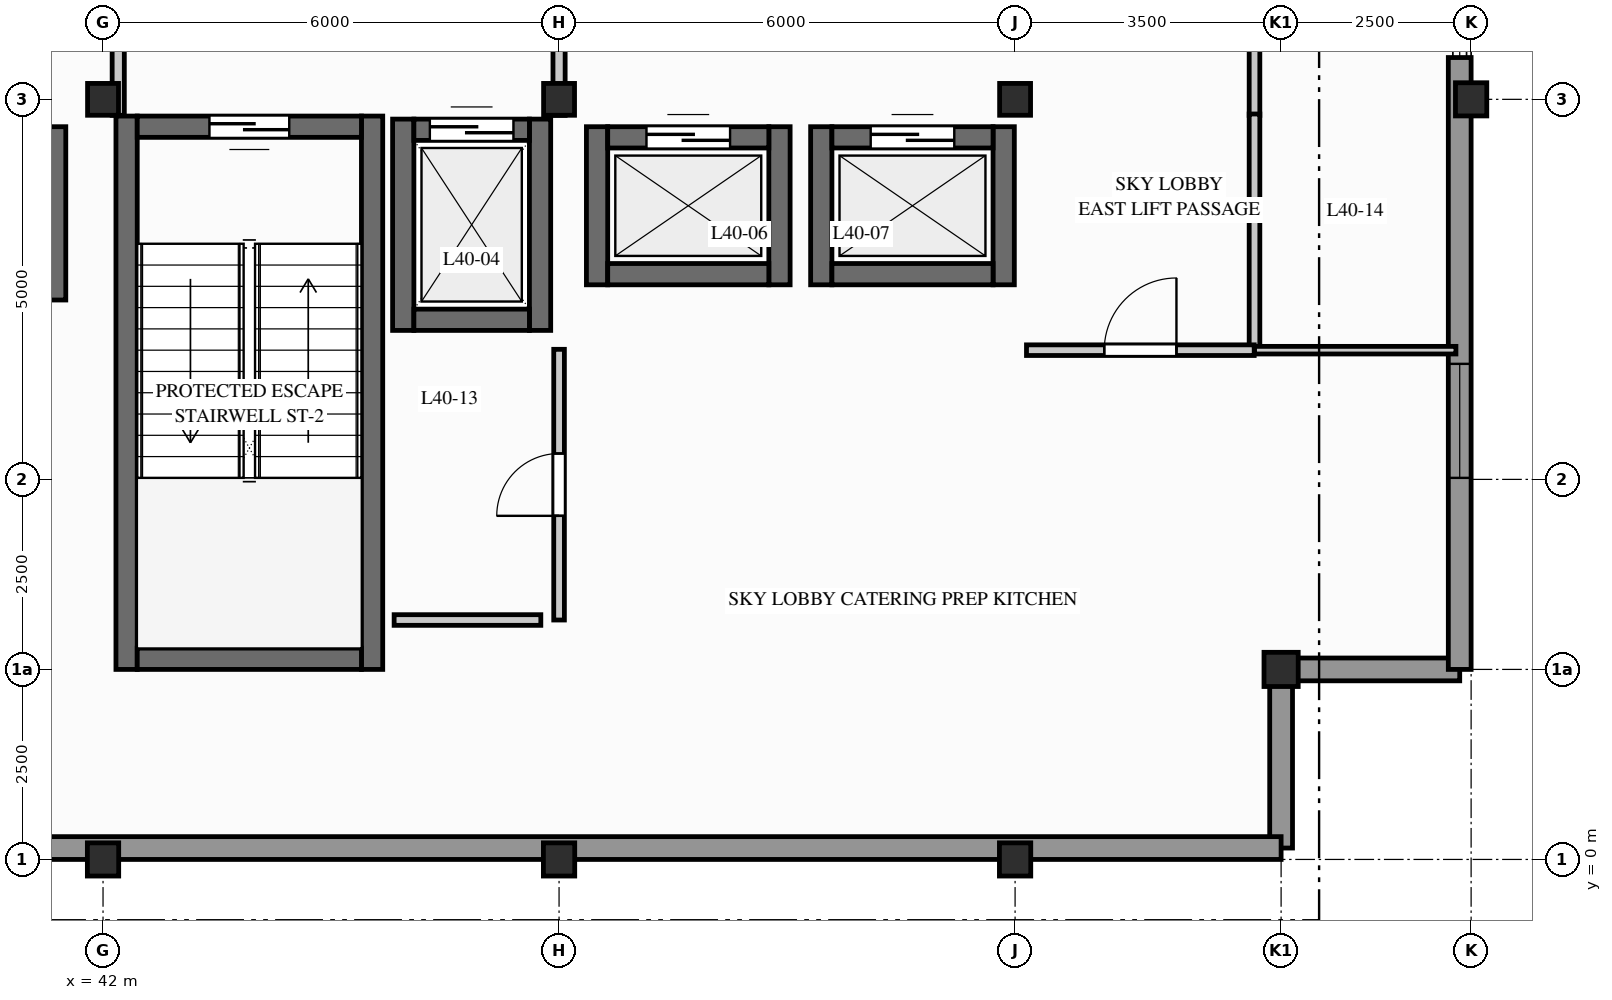
"""IFC4 building model, lengths in metres.
Left out: names, types, materials, properties, quantities, classifications, styles, units other than length and angle.
Written with IfcOpenShell. Run it as: python <this file> out.ifc"""

import sys

from ifc_helpers import new_model, si_unit, direction, frame, frame_2d, origin, origin_2d, place, context, subcontext, project, spatial, rectangle, hollow_rectangle, i_section, extrude, element, fill, save


model = new_model("IFC4")
c1 = context("Model", 3, precision=1e-05, world=origin(), true_north=direction((0.0, 1.0)))
c2 = subcontext(c1, "Body", "Model", "MODEL_VIEW")
j1 = project(units=[si_unit("LENGTHUNIT", "METRE"), si_unit("PLANEANGLEUNIT", "RADIAN")], contexts=[c1])
p1 = place(None, origin())
s1 = spatial("IfcSite", under=j1, at=p1, CompositionType="ELEMENT")
p2 = place(p1, origin())
s2 = spatial("IfcBuilding", under=s1, at=p2, CompositionType="ELEMENT")
p3 = place(p2, frame((0.0, 0.0, 134.5)))
s3 = spatial("IfcBuildingStorey", under=s2, at=p3, CompositionType="ELEMENT", Elevation=134.5)
p4 = place(p3, frame((42.0, 0.0, 0.0), z_axis=(0.0, 0.0, 1.0), x_axis=(1.0, 0.0, 0.0)))
e1 = element("IfcColumn", 1, at=p4, inside=s3, PredefinedType="COLUMN", context=c2, shape_type="SweptSolid", body=[
    extrude(i_section(OverallWidth=0.412, OverallDepth=0.437, WebThickness=0.036, FlangeThickness=0.058, FilletRadius=0.015, at=origin_2d()), origin(), (0.0, 0.0, 1.0), 4.2),
])
p5 = place(p3, frame((42.0, 10.0, 0.0), z_axis=(0.0, 0.0, 1.0), x_axis=(1.0, 0.0, 0.0)))
e2 = element("IfcColumn", 2, at=p5, inside=s3, PredefinedType="COLUMN", context=c2, shape_type="SweptSolid", body=[
    extrude(i_section(OverallWidth=0.407, OverallDepth=0.419, WebThickness=0.031, FlangeThickness=0.049, FilletRadius=0.015, at=origin_2d()), origin(), (0.0, 0.0, 1.0), 4.2),
])
p6 = place(p3, frame((48.0, 0.0, 0.0), z_axis=(0.0, 0.0, 1.0), x_axis=(1.0, 0.0, 0.0)))
e3 = element("IfcColumn", 3, at=p6, inside=s3, PredefinedType="COLUMN", context=c2, shape_type="SweptSolid", body=[
    extrude(i_section(OverallWidth=0.412, OverallDepth=0.437, WebThickness=0.036, FlangeThickness=0.058, FilletRadius=0.015, at=origin_2d()), origin(), (0.0, 0.0, 1.0), 4.2),
])
p7 = place(p3, frame((48.0, 10.0, 0.0), z_axis=(0.0, 0.0, 1.0), x_axis=(1.0, 0.0, 0.0)))
e4 = element("IfcColumn", 4, at=p7, inside=s3, PredefinedType="COLUMN", context=c2, shape_type="SweptSolid", body=[
    extrude(i_section(OverallWidth=0.407, OverallDepth=0.419, WebThickness=0.031, FlangeThickness=0.049, FilletRadius=0.015, at=origin_2d()), origin(), (0.0, 0.0, 1.0), 4.2),
])
p8 = place(p3, frame((54.0, 0.0, 0.0), z_axis=(0.0, 0.0, 1.0), x_axis=(1.0, 0.0, 0.0)))
e5 = element("IfcColumn", 5, at=p8, inside=s3, PredefinedType="COLUMN", context=c2, shape_type="SweptSolid", body=[
    extrude(i_section(OverallWidth=0.412, OverallDepth=0.437, WebThickness=0.036, FlangeThickness=0.058, FilletRadius=0.015, at=origin_2d()), origin(), (0.0, 0.0, 1.0), 4.2),
])
p9 = place(p3, frame((54.0, 10.0, 0.0), z_axis=(0.0, 0.0, 1.0), x_axis=(1.0, 0.0, 0.0)))
e6 = element("IfcColumn", 6, at=p9, inside=s3, PredefinedType="COLUMN", context=c2, shape_type="SweptSolid", body=[
    extrude(i_section(OverallWidth=0.407, OverallDepth=0.419, WebThickness=0.031, FlangeThickness=0.049, FilletRadius=0.015, at=origin_2d()), origin(), (0.0, 0.0, 1.0), 4.2),
])
p10 = place(p3, frame((57.5, 2.5, 0.0), z_axis=(0.0, 0.0, 1.0), x_axis=(1.0, 0.0, 0.0)))
e7 = element("IfcColumn", 7, at=p10, inside=s3, PredefinedType="COLUMN", context=c2, shape_type="SweptSolid", body=[
    extrude(hollow_rectangle(XDim=0.45, YDim=0.45, WallThickness=0.025, InnerFilletRadius=0.012, OuterFilletRadius=0.024, at=origin_2d()), origin(), (0.0, 0.0, 1.0), 4.2),
])
p11 = place(p3, frame((60.0, 10.0, 0.0), z_axis=(0.0, 0.0, 1.0), x_axis=(1.0, 0.0, 0.0)))
e8 = element("IfcColumn", 8, at=p11, inside=s3, PredefinedType="COLUMN", context=c2, shape_type="SweptSolid", body=[
    extrude(i_section(OverallWidth=0.412, OverallDepth=0.437, WebThickness=0.036, FlangeThickness=0.058, FilletRadius=0.015, at=origin_2d()), origin(), (0.0, 0.0, 1.0), 4.2),
])
for number, where, z_axis, x_axis in (
    (9, (57.5, 0.15, 0.0), (0.0, 0.0, 1.0), (0.0, 1.0, 0.0)),
    (10, (57.5, 2.5, 0.0), (0.0, 0.0, 1.0), (1.0, 0.0, 0.0)),
):
    element("IfcWall", number, at=place(p3, frame(where, z_axis=z_axis, x_axis=x_axis)), inside=s3, PredefinedType="STANDARD", context=c2, shape_type="SweptSolid", body=[
        extrude(rectangle(XDim=2.35, YDim=0.3, at=frame_2d((1.175, 0.0))), origin(), (0.0, 0.0, 1.0), 3.98),
    ])
p12 = place(p3, frame((2.5, 0.15, 0.0), z_axis=(0.0, 0.0, 1.0), x_axis=(1.0, 0.0, 0.0)))
e11 = element("IfcWall", 11, at=p12, inside=s3, PredefinedType="STANDARD", context=c2, shape_type="SweptSolid", body=[
    extrude(rectangle(XDim=55.0, YDim=0.3, at=frame_2d((27.5, 0.0))), origin(), (0.0, 0.0, 1.0), 3.422),
])
p13 = place(p3, frame((59.85, 2.5, 0.0), z_axis=(0.0, 0.0, 1.0), x_axis=(0.0, 1.0, 0.0)))
e12 = element("IfcWall", 12, at=p13, inside=s3, PredefinedType="STANDARD", context=c2, shape_type="SweptSolid", body=[
    extrude(rectangle(XDim=8.05, YDim=0.3, at=frame_2d((4.025, 0.0))), origin(), (0.0, 0.0, 1.0), 3.98),
])
p14 = place(p13, frame((2.52, 0.0, 0.95)))
e13 = element("IfcOpeningElement", 13, at=p14, cuts=e12, PredefinedType="OPENING", context=c2, shape_type="SweptSolid", body=[
    extrude(rectangle(XDim=1.5, YDim=1.8, at=frame_2d((0.75, 0.9))), frame((0.0, 0.16, 0.0), z_axis=(0.0, -1.0, 0.0), x_axis=(1.0, 0.0, 0.0)), (0.0, 0.0, 1.0), 0.32),
])
for number, where, z_axis, x_axis in (
    (14, (42.31, 2.5, 0.0), (0.0, 0.0, 1.0), (0.0, 1.0, 0.0)),
    (15, (45.54, 2.5, 0.0), (0.0, 0.0, 1.0), (0.0, 1.0, 0.0)),
):
    element("IfcWall", number, at=place(p3, frame(where, z_axis=z_axis, x_axis=x_axis)), inside=s3, PredefinedType="SHEAR", context=c2, shape_type="SweptSolid", body=[
        extrude(rectangle(XDim=7.28, YDim=0.28, at=frame_2d((3.64, 0.0))), origin(), (0.0, 0.0, 1.0), 3.98),
    ])
p15 = place(p3, frame((42.45, 2.64, 0.0), z_axis=(0.0, 0.0, 1.0), x_axis=(1.0, 0.0, 0.0)))
e16 = element("IfcWall", 16, at=p15, inside=s3, PredefinedType="SHEAR", context=c2, shape_type="SweptSolid", body=[
    extrude(rectangle(XDim=2.95, YDim=0.28, at=frame_2d((1.475, 0.0))), origin(), (0.0, 0.0, 1.0), 3.98),
])
p16 = place(p3, frame((45.4, 9.64, 0.0), z_axis=(0.0, 0.0, 1.0), x_axis=(-1.0, 0.0, 0.0)))
e17 = element("IfcWall", 17, at=p16, inside=s3, PredefinedType="SHEAR", context=c2, shape_type="SweptSolid", body=[
    extrude(rectangle(XDim=2.95, YDim=0.28, at=frame_2d((1.475, 0.0))), origin(), (0.0, 0.0, 1.0), 3.98),
])
p17 = place(p16, frame((0.95, 0.0, 0.0)))
e18 = element("IfcOpeningElement", 18, at=p17, cuts=e17, PredefinedType="OPENING", context=c2, shape_type="SweptSolid", body=[
    extrude(rectangle(XDim=1.05, YDim=2.06, at=frame_2d((0.525, 1.03))), frame((0.0, 0.15, 0.0), z_axis=(0.0, -1.0, 0.0), x_axis=(1.0, 0.0, 0.0)), (0.0, 0.0, 1.0), 0.3),
])
for number, where, z_axis, x_axis in (
    (19, (45.95, 6.96, 0.0), (0.0, 0.0, 1.0), (0.0, 1.0, 0.0)),
    (20, (47.75, 6.96, 0.0), (0.0, 0.0, 1.0), (0.0, 1.0, 0.0)),
):
    element("IfcWall", number, at=place(p3, frame(where, z_axis=z_axis, x_axis=x_axis)), inside=s3, PredefinedType="SHEAR", context=c2, shape_type="SweptSolid", body=[
        extrude(rectangle(XDim=2.78, YDim=0.28, at=frame_2d((1.39, 0.0))), origin(), (0.0, 0.0, 1.0), 3.98),
    ])
p18 = place(p3, frame((46.09, 7.1, 0.0), z_axis=(0.0, 0.0, 1.0), x_axis=(1.0, 0.0, 0.0)))
e21 = element("IfcWall", 21, at=p18, inside=s3, PredefinedType="SHEAR", context=c2, shape_type="SweptSolid", body=[
    extrude(rectangle(XDim=1.52, YDim=0.28, at=frame_2d((0.76, 0.0))), origin(), (0.0, 0.0, 1.0), 3.98),
])
p19 = place(p3, frame((46.09, 9.6, 0.0), z_axis=(0.0, 0.0, 1.0), x_axis=(1.0, 0.0, 0.0)))
e22 = element("IfcWall", 22, at=p19, inside=s3, PredefinedType="SHEAR", context=c2, shape_type="SweptSolid", body=[
    extrude(rectangle(XDim=1.52, YDim=0.28, at=frame_2d((0.76, 0.0))), origin(), (0.0, 0.0, 1.0), 3.98),
])
p20 = place(p19, frame((0.21, 0.0, 0.0)))
e23 = element("IfcOpeningElement", 23, at=p20, cuts=e22, PredefinedType="OPENING", context=c2, shape_type="SweptSolid", body=[
    extrude(rectangle(XDim=1.1, YDim=2.06, at=frame_2d((0.55, 1.03))), frame((0.0, 0.15, 0.0), z_axis=(0.0, -1.0, 0.0), x_axis=(1.0, 0.0, 0.0)), (0.0, 0.0, 1.0), 0.3),
])
p21 = place(p3, frame((41.37, 7.36, 0.0), z_axis=(0.0, 0.0, 1.0), x_axis=(0.0, 1.0, 0.0)))
e24 = element("IfcWall", 24, at=p21, inside=s3, PredefinedType="SHEAR", context=c2, shape_type="SweptSolid", body=[
    extrude(rectangle(XDim=2.28, YDim=0.28, at=frame_2d((1.14, 0.0))), origin(), (0.0, 0.0, 1.0), 3.98),
])
for number, where, z_axis, x_axis in (
    (25, (48.5, 7.56, 0.0), (0.0, 0.0, 1.0), (0.0, 1.0, 0.0)),
    (26, (50.9, 7.56, 0.0), (0.0, 0.0, 1.0), (0.0, 1.0, 0.0)),
):
    element("IfcWall", number, at=place(p3, frame(where, z_axis=z_axis, x_axis=x_axis)), inside=s3, PredefinedType="SHEAR", context=c2, shape_type="SweptSolid", body=[
        extrude(rectangle(XDim=2.08, YDim=0.28, at=frame_2d((1.04, 0.0))), origin(), (0.0, 0.0, 1.0), 3.98),
    ])
p22 = place(p3, frame((48.64, 7.7, 0.0), z_axis=(0.0, 0.0, 1.0), x_axis=(1.0, 0.0, 0.0)))
e27 = element("IfcWall", 27, at=p22, inside=s3, PredefinedType="SHEAR", context=c2, shape_type="SweptSolid", body=[
    extrude(rectangle(XDim=2.12, YDim=0.28, at=frame_2d((1.06, 0.0))), origin(), (0.0, 0.0, 1.0), 3.98),
])
p23 = place(p3, frame((48.64, 9.5, 0.0), z_axis=(0.0, 0.0, 1.0), x_axis=(1.0, 0.0, 0.0)))
e28 = element("IfcWall", 28, at=p23, inside=s3, PredefinedType="SHEAR", context=c2, shape_type="SweptSolid", body=[
    extrude(rectangle(XDim=2.12, YDim=0.28, at=frame_2d((1.06, 0.0))), origin(), (0.0, 0.0, 1.0), 3.98),
])
p24 = place(p23, frame((0.51, 0.0, 0.0)))
e29 = element("IfcOpeningElement", 29, at=p24, cuts=e28, PredefinedType="OPENING", context=c2, shape_type="SweptSolid", body=[
    extrude(rectangle(XDim=1.1, YDim=2.06, at=frame_2d((0.55, 1.03))), frame((0.0, 0.15, 0.0), z_axis=(0.0, -1.0, 0.0), x_axis=(1.0, 0.0, 0.0)), (0.0, 0.0, 1.0), 0.3),
])
for number, where, z_axis, x_axis in (
    (30, (51.45, 7.56, 0.0), (0.0, 0.0, 1.0), (0.0, 1.0, 0.0)),
    (31, (53.85, 7.56, 0.0), (0.0, 0.0, 1.0), (0.0, 1.0, 0.0)),
):
    element("IfcWall", number, at=place(p3, frame(where, z_axis=z_axis, x_axis=x_axis)), inside=s3, PredefinedType="SHEAR", context=c2, shape_type="SweptSolid", body=[
        extrude(rectangle(XDim=2.08, YDim=0.28, at=frame_2d((1.04, 0.0))), origin(), (0.0, 0.0, 1.0), 3.98),
    ])
p25 = place(p3, frame((51.59, 7.7, 0.0), z_axis=(0.0, 0.0, 1.0), x_axis=(1.0, 0.0, 0.0)))
e32 = element("IfcWall", 32, at=p25, inside=s3, PredefinedType="SHEAR", context=c2, shape_type="SweptSolid", body=[
    extrude(rectangle(XDim=2.12, YDim=0.28, at=frame_2d((1.06, 0.0))), origin(), (0.0, 0.0, 1.0), 3.98),
])
p26 = place(p3, frame((51.59, 9.5, 0.0), z_axis=(0.0, 0.0, 1.0), x_axis=(1.0, 0.0, 0.0)))
e33 = element("IfcWall", 33, at=p26, inside=s3, PredefinedType="SHEAR", context=c2, shape_type="SweptSolid", body=[
    extrude(rectangle(XDim=2.12, YDim=0.28, at=frame_2d((1.06, 0.0))), origin(), (0.0, 0.0, 1.0), 3.98),
])
p27 = place(p26, frame((0.51, 0.0, 0.0)))
e34 = element("IfcOpeningElement", 34, at=p27, cuts=e33, PredefinedType="OPENING", context=c2, shape_type="SweptSolid", body=[
    extrude(rectangle(XDim=1.1, YDim=2.06, at=frame_2d((0.55, 1.03))), frame((0.0, 0.15, 0.0), z_axis=(0.0, -1.0, 0.0), x_axis=(1.0, 0.0, 0.0)), (0.0, 0.0, 1.0), 0.3),
])
p28 = place(p3, frame((48.0, 3.15, 0.0), z_axis=(0.0, 0.0, 1.0), x_axis=(0.0, 1.0, 0.0)))
e35 = element("IfcWall", 35, at=p28, inside=s3, PredefinedType="PARTITIONING", context=c2, shape_type="SweptSolid", body=[
    extrude(rectangle(XDim=3.561, YDim=0.14, at=frame_2d((1.781, 0.0))), origin(), (0.0, 0.0, 1.0), 3.343),
])
p29 = place(p28, frame((1.371, 0.0, 0.0)))
e36 = element("IfcOpeningElement", 36, at=p29, cuts=e35, PredefinedType="OPENING", context=c2, shape_type="SweptSolid", body=[
    extrude(rectangle(XDim=0.82, YDim=2.02, at=frame_2d((0.41, 1.01))), frame((0.0, 0.08, 0.0), z_axis=(0.0, -1.0, 0.0), x_axis=(1.0, 0.0, 0.0)), (0.0, 0.0, 1.0), 0.16),
])
p30 = place(p3, frame((57.15, 9.789, 0.0), z_axis=(0.0, 0.0, 1.0), x_axis=(0.0, 1.0, 0.0)))
e37 = element("IfcWall", 37, at=p30, inside=s3, PredefinedType="PARTITIONING", context=c2, shape_type="SweptSolid", body=[
    extrude(rectangle(XDim=3.011, YDim=0.14, at=frame_2d((1.506, 0.0))), origin(), (0.0, 0.0, 1.0), 3.343),
])
p31 = place(p30, frame((1.031, 0.0, 0.0)))
e38 = element("IfcOpeningElement", 38, at=p31, cuts=e37, PredefinedType="OPENING", context=c2, shape_type="SweptSolid", body=[
    extrude(rectangle(XDim=0.95, YDim=2.05, at=frame_2d((0.475, 1.025))), frame((0.0, 0.08, 0.0), z_axis=(0.0, -1.0, 0.0), x_axis=(1.0, 0.0, 0.0)), (0.0, 0.0, 1.0), 0.16),
])
p32 = place(p3, frame((57.15, 6.7, 0.0), z_axis=(0.0, 0.0, 1.0), x_axis=(0.0, 1.0, 0.0)))
e39 = element("IfcWall", 39, at=p32, inside=s3, PredefinedType="PARTITIONING", context=c2, shape_type="SweptSolid", body=[
    extrude(rectangle(XDim=3.107, YDim=0.14, at=frame_2d((1.554, 0.0))), origin(), (0.0, 0.0, 1.0), 3.98),
])
p33 = place(p3, frame((57.15, 6.7, 0.0), z_axis=(0.0, 0.0, 1.0), x_axis=(1.0, 0.0, 0.0)))
e40 = element("IfcWall", 40, at=p33, inside=s3, PredefinedType="PARTITIONING", context=c2, shape_type="SweptSolid", body=[
    extrude(rectangle(XDim=2.65, YDim=0.1, at=frame_2d((1.325, 0.0))), origin(), (0.0, 0.0, 1.0), 3.98),
])
p34 = place(p3, frame((42.2, 9.79, 0.0), z_axis=(0.0, 0.0, 1.0), x_axis=(0.0, 1.0, 0.0)))
e41 = element("IfcWall", 41, at=p34, inside=s3, PredefinedType="PARTITIONING", context=c2, shape_type="SweptSolid", body=[
    extrude(rectangle(XDim=2.81, YDim=0.16, at=frame_2d((1.405, 0.0))), origin(), (0.0, 0.0, 1.0), 3.343),
])
p35 = place(p34, frame((0.88, 0.0, 0.0)))
e42 = element("IfcOpeningElement", 42, at=p35, cuts=e41, PredefinedType="OPENING", context=c2, shape_type="SweptSolid", body=[
    extrude(rectangle(XDim=1.05, YDim=2.06, at=frame_2d((0.525, 1.03))), frame((0.0, 0.09, 0.0), z_axis=(0.0, -1.0, 0.0), x_axis=(1.0, 0.0, 0.0)), (0.0, 0.0, 1.0), 0.18),
])
p36 = place(p3, frame((48.0, 9.789, 0.0), z_axis=(0.0, 0.0, 1.0), x_axis=(0.0, 1.0, 0.0)))
e43 = element("IfcWall", 43, at=p36, inside=s3, PredefinedType="PARTITIONING", context=c2, shape_type="SweptSolid", body=[
    extrude(rectangle(XDim=2.811, YDim=0.16, at=frame_2d((1.406, 0.0))), origin(), (0.0, 0.0, 1.0), 3.343),
])
p37 = place(p36, frame((0.881, 0.0, 0.0)))
e44 = element("IfcOpeningElement", 44, at=p37, cuts=e43, PredefinedType="OPENING", context=c2, shape_type="SweptSolid", body=[
    extrude(rectangle(XDim=1.05, YDim=2.06, at=frame_2d((0.525, 1.03))), frame((0.0, 0.09, 0.0), z_axis=(0.0, -1.0, 0.0), x_axis=(1.0, 0.0, 0.0)), (0.0, 0.0, 1.0), 0.18),
])
p38 = place(p3, frame((54.15, 6.7, 0.0), z_axis=(0.0, 0.0, 1.0), x_axis=(1.0, 0.0, 0.0)))
e45 = element("IfcWall", 45, at=p38, inside=s3, PredefinedType="PARTITIONING", context=c2, shape_type="SweptSolid", body=[
    extrude(rectangle(XDim=2.996, YDim=0.14, at=frame_2d((1.498, 0.0))), origin(), (0.0, 0.0, 1.0), 3.98),
])
p39 = place(p38, frame((1.023, 0.0, 0.0)))
e46 = element("IfcOpeningElement", 46, at=p39, cuts=e45, PredefinedType="OPENING", context=c2, shape_type="SweptSolid", body=[
    extrude(rectangle(XDim=0.95, YDim=2.05, at=frame_2d((0.475, 1.025))), frame((0.0, 0.08, 0.0), z_axis=(0.0, -1.0, 0.0), x_axis=(1.0, 0.0, 0.0)), (0.0, 0.0, 1.0), 0.16),
])
p40 = place(p3, frame((45.83, 3.15, 0.0), z_axis=(0.0, 0.0, 1.0), x_axis=(1.0, 0.0, 0.0)))
e47 = element("IfcWall", 47, at=p40, inside=s3, PredefinedType="PARTITIONING", context=c2, shape_type="SweptSolid", body=[
    extrude(rectangle(XDim=1.93, YDim=0.14, at=frame_2d((0.965, 0.0))), origin(), (0.0, 0.0, 1.0), 3.98),
])
p41 = place(p14, origin())
e48 = element("IfcWindow", 48, at=p41, inside=s3, PartitioningType="SINGLE_PANEL", PredefinedType="WINDOW", context=c2, shape_type="SweptSolid", body=[
    extrude(rectangle(XDim=1.5, YDim=1.8, at=frame_2d((0.75, 0.9))), frame((0.0, 0.03, 0.0), z_axis=(0.0, -1.0, 0.0), x_axis=(1.0, 0.0, 0.0)), (0.0, 0.0, 1.0), 0.06),
])
fill(e13, e48)
p42 = place(p17, origin())
e49 = element("IfcDoor", 49, at=p42, inside=s3, OperationType="SINGLE_SWING_LEFT", PredefinedType="DOOR", context=c2, shape_type="SweptSolid", body=[
    extrude(rectangle(XDim=1.05, YDim=2.06, at=frame_2d((0.525, 1.03))), frame((0.0, 0.025, 0.0), z_axis=(0.0, -1.0, 0.0), x_axis=(1.0, 0.0, 0.0)), (0.0, 0.0, 1.0), 0.05),
])
fill(e18, e49)
p43 = place(p20, origin())
e50 = element("IfcDoor", 50, at=p43, inside=s3, OperationType="SLIDING_TO_LEFT", PredefinedType="DOOR", context=c2, shape_type="SweptSolid", body=[
    extrude(rectangle(XDim=1.1, YDim=2.06, at=frame_2d((0.55, 1.03))), frame((0.0, 0.025, 0.0), z_axis=(0.0, -1.0, 0.0), x_axis=(1.0, 0.0, 0.0)), (0.0, 0.0, 1.0), 0.05),
])
fill(e23, e50)
p44 = place(p24, origin())
e51 = element("IfcDoor", 51, at=p44, inside=s3, OperationType="SLIDING_TO_LEFT", PredefinedType="DOOR", context=c2, shape_type="SweptSolid", body=[
    extrude(rectangle(XDim=1.1, YDim=2.06, at=frame_2d((0.55, 1.03))), frame((0.0, 0.025, 0.0), z_axis=(0.0, -1.0, 0.0), x_axis=(1.0, 0.0, 0.0)), (0.0, 0.0, 1.0), 0.05),
])
fill(e29, e51)
p45 = place(p27, origin())
e52 = element("IfcDoor", 52, at=p45, inside=s3, OperationType="SLIDING_TO_RIGHT", PredefinedType="DOOR", context=c2, shape_type="SweptSolid", body=[
    extrude(rectangle(XDim=1.1, YDim=2.06, at=frame_2d((0.55, 1.03))), frame((0.0, 0.025, 0.0), z_axis=(0.0, -1.0, 0.0), x_axis=(1.0, 0.0, 0.0)), (0.0, 0.0, 1.0), 0.05),
])
fill(e34, e52)
p46 = place(p39, origin())
e53 = element("IfcDoor", 53, at=p46, inside=s3, OperationType="SINGLE_SWING_RIGHT", PredefinedType="DOOR", context=c2, shape_type="SweptSolid", body=[
    extrude(rectangle(XDim=0.95, YDim=2.05, at=frame_2d((0.475, 1.025))), frame((0.0, 0.025, 0.0), z_axis=(0.0, -1.0, 0.0), x_axis=(1.0, 0.0, 0.0)), (0.0, 0.0, 1.0), 0.05),
])
fill(e46, e53)
p47 = place(p29, origin())
e54 = element("IfcDoor", 54, at=p47, inside=s3, OperationType="SINGLE_SWING_LEFT", PredefinedType="DOOR", context=c2, shape_type="SweptSolid", body=[
    extrude(rectangle(XDim=0.82, YDim=2.02, at=frame_2d((0.41, 1.01))), frame((0.0, 0.025, 0.0), z_axis=(0.0, -1.0, 0.0), x_axis=(1.0, 0.0, 0.0)), (0.0, 0.0, 1.0), 0.05),
])
fill(e36, e54)
save(model, sys.argv[1])
